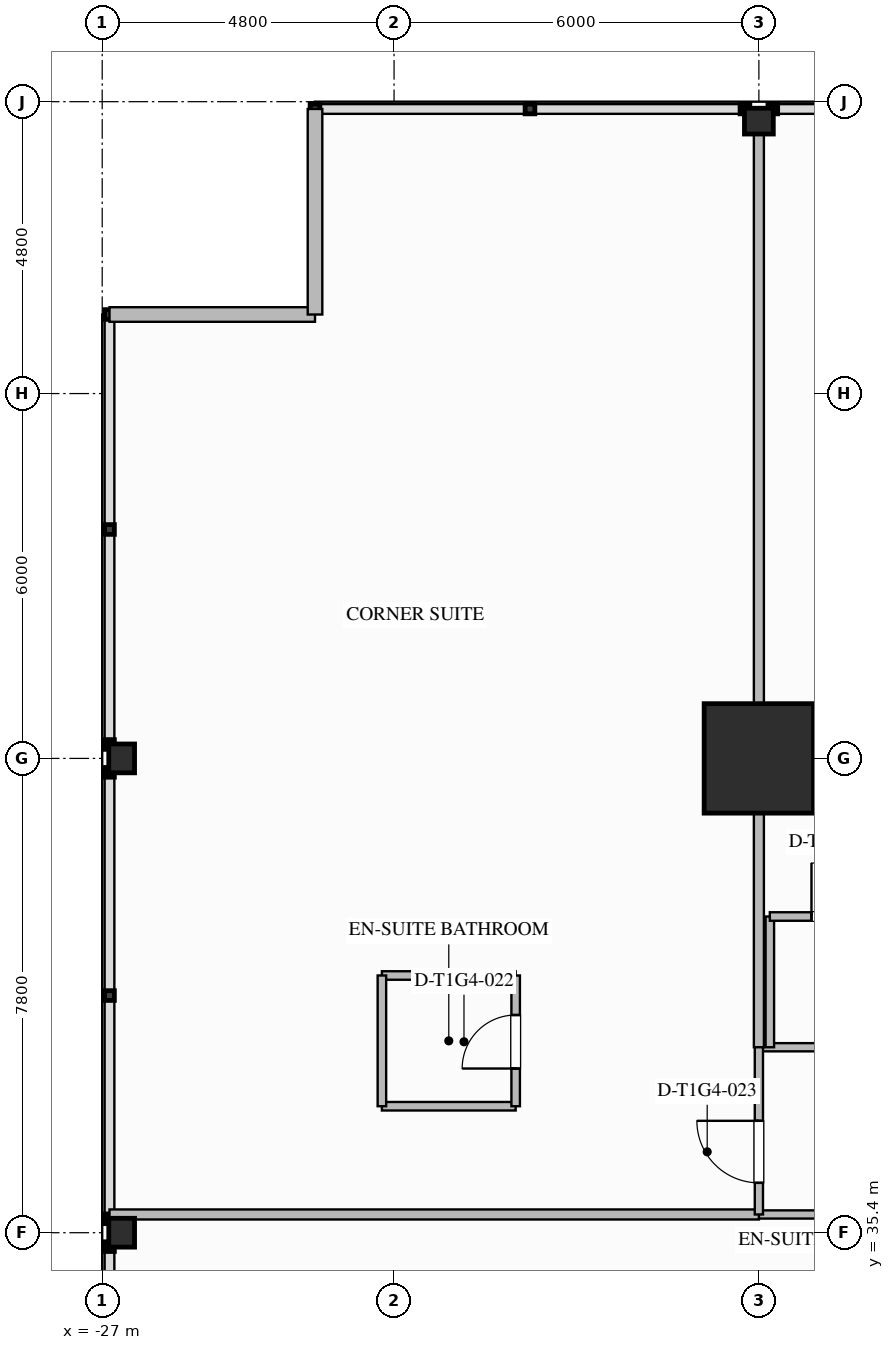
"""IFC4 building model, lengths in metres.
Left out: names, types, materials, properties, quantities, classifications, styles, units other than length and angle.
Written with IfcOpenShell. Run it as: python <this file> out.ifc"""

import sys

from ifc_helpers import new_model, si_unit, direction, frame, frame_2d, origin, origin_2d, place, context, subcontext, project, spatial, rectangle, i_section, extrude, element, fill, save


model = new_model("IFC4")
c1 = context("Model", 3, precision=1e-05, world=origin(), true_north=direction((0.0, 1.0)))
c2 = subcontext(c1, "Body", "Model", "MODEL_VIEW")
j1 = project(units=[si_unit("LENGTHUNIT", "METRE"), si_unit("PLANEANGLEUNIT", "RADIAN")], contexts=[c1])
p1 = place(None, origin())
s1 = spatial("IfcSite", under=j1, at=p1, CompositionType="ELEMENT")
p2 = place(p1, origin())
s2 = spatial("IfcBuilding", under=s1, at=p2, CompositionType="ELEMENT")
p3 = place(p2, frame((0.0, 0.0, 64.7)))
s3 = spatial("IfcBuildingStorey", under=s2, at=p3, CompositionType="ELEMENT", Elevation=64.7)
p4 = place(p3, frame((-16.2, 43.2, 0.0), z_axis=(0.0, 0.0, 1.0), x_axis=(1.0, 0.0, 0.0)))
e1 = element("IfcColumn", 1, at=p4, inside=s3, PredefinedType="COLUMN", context=c2, shape_type="SweptSolid", body=[
    extrude(rectangle(XDim=1.8, YDim=1.8, at=origin_2d()), origin(), (0.0, 0.0, 1.0), 3.5),
])
for number, where, z_axis, x_axis in (
    (2, (-26.68, 35.4, 0.0), (0.0, 0.0, 1.0), (1.0, 0.0, 0.0)),
    (3, (-26.68, 43.2, 0.0), (0.0, 0.0, 1.0), (1.0, 0.0, 0.0)),
    (4, (-16.2, 53.68, 0.0), (0.0, 0.0, 1.0), (0.0, 1.0, 0.0)),
):
    element("IfcColumn", number, at=place(p3, frame(where, z_axis=z_axis, x_axis=x_axis)), inside=s3, PredefinedType="COLUMN", context=c2, shape_type="SweptSolid", body=[
        extrude(i_section(OverallWidth=0.424, OverallDepth=0.474, WebThickness=0.048, FlangeThickness=0.077, FilletRadius=0.03, at=origin_2d()), origin(), (0.0, 0.0, 1.0), 3.497),
    ])
for number, where, z_axis, x_axis in (
    (5, (-26.88, 50.5, 0.0), (0.0, 0.0, 1.0), (1.0, 0.0, 0.0)),
    (6, (-23.5, 50.5, 0.0), (0.0, 0.0, 1.0), (0.0, 1.0, 0.0)),
):
    element("IfcWall", number, at=place(p3, frame(where, z_axis=z_axis, x_axis=x_axis)), inside=s3, PredefinedType="STANDARD", context=c2, shape_type="SweptSolid", body=[
        extrude(rectangle(XDim=3.38, YDim=0.24, at=frame_2d((1.69, 0.0))), origin(), (0.0, 0.0, 1.0), 3.24),
    ])
p5 = place(p3, frame((-16.2, 38.45, 0.0), z_axis=(0.0, 0.0, 1.0), x_axis=(1.0, 0.0, 0.0)))
e7 = element("IfcWall", 7, at=p5, inside=s3, PredefinedType="PARTITIONING", context=c2, shape_type="SweptSolid", body=[
    extrude(rectangle(XDim=32.4, YDim=0.135, at=frame_2d((16.2, 0.0))), origin(), (0.0, 0.0, 1.0), 3.24),
])
p6 = place(p5, frame((3.285, 0.0, 0.0)))
e8 = element("IfcOpeningElement", 8, at=p6, cuts=e7, PredefinedType="OPENING", context=c2, shape_type="SweptSolid", body=[
    extrude(rectangle(XDim=1.26, YDim=2.2, at=frame_2d((0.63, 1.1))), frame((0.0, 0.077, 0.0), z_axis=(0.0, -1.0, 0.0), x_axis=(1.0, 0.0, 0.0)), (0.0, 0.0, 1.0), 0.155),
])
p7 = place(p5, frame((8.59, 0.0, 0.0)))
e9 = element("IfcOpeningElement", 9, at=p7, cuts=e7, PredefinedType="OPENING", context=c2, shape_type="SweptSolid", body=[
    extrude(rectangle(XDim=0.96, YDim=2.15, at=frame_2d((0.48, 1.075))), frame((0.0, 0.077, 0.0), z_axis=(0.0, -1.0, 0.0), x_axis=(1.0, 0.0, 0.0)), (0.0, 0.0, 1.0), 0.155),
])
p8 = place(p5, frame((13.84, 0.0, 0.0)))
e10 = element("IfcOpeningElement", 10, at=p8, cuts=e7, PredefinedType="OPENING", context=c2, shape_type="SweptSolid", body=[
    extrude(rectangle(XDim=1.26, YDim=2.2, at=frame_2d((0.63, 1.1))), frame((0.0, 0.077, 0.0), z_axis=(0.0, -1.0, 0.0), x_axis=(1.0, 0.0, 0.0)), (0.0, 0.0, 1.0), 0.155),
])
p9 = place(p5, frame((18.635, 0.0, 0.0)))
e11 = element("IfcOpeningElement", 11, at=p9, cuts=e7, PredefinedType="OPENING", context=c2, shape_type="SweptSolid", body=[
    extrude(rectangle(XDim=1.02, YDim=2.15, at=frame_2d((0.51, 1.075))), frame((0.0, 0.077, 0.0), z_axis=(0.0, -1.0, 0.0), x_axis=(1.0, 0.0, 0.0)), (0.0, 0.0, 1.0), 0.155),
])
p10 = place(p5, frame((25.281, 0.0, 0.0)))
e12 = element("IfcOpeningElement", 12, at=p10, cuts=e7, PredefinedType="OPENING", context=c2, shape_type="SweptSolid", body=[
    extrude(rectangle(XDim=0.96, YDim=2.15, at=frame_2d((0.48, 1.075))), frame((0.0, 0.077, 0.0), z_axis=(0.0, -1.0, 0.0), x_axis=(1.0, 0.0, 0.0)), (0.0, 0.0, 1.0), 0.155),
])
p11 = place(p5, frame((30.285, 0.0, 0.0)))
e13 = element("IfcOpeningElement", 13, at=p11, cuts=e7, PredefinedType="OPENING", context=c2, shape_type="SweptSolid", body=[
    extrude(rectangle(XDim=1.26, YDim=2.2, at=frame_2d((0.63, 1.1))), frame((0.0, 0.077, 0.0), z_axis=(0.0, -1.0, 0.0), x_axis=(1.0, 0.0, 0.0)), (0.0, 0.0, 1.0), 0.155),
])
p12 = place(p3, frame((-16.2, 35.7, 0.0), z_axis=(0.0, 0.0, 1.0), x_axis=(1.0, 0.0, 0.0)))
e14 = element("IfcWall", 14, at=p12, inside=s3, PredefinedType="PARTITIONING", context=c2, shape_type="SweptSolid", body=[
    extrude(rectangle(XDim=5.4, YDim=0.135, at=frame_2d((2.7, 0.0))), origin(), (0.0, 0.0, 1.0), 3.24),
])
p13 = place(p3, frame((-16.2, 38.45, 0.0), z_axis=(0.0, 0.0, 1.0), x_axis=(0.0, 1.0, 0.0)))
e15 = element("IfcWall", 15, at=p13, inside=s3, PredefinedType="PARTITIONING", context=c2, shape_type="SweptSolid", body=[
    extrude(rectangle(XDim=15.43, YDim=0.165, at=frame_2d((7.715, 0.0))), origin(), (0.0, 0.0, 1.0), 2.452),
])
p14 = place(p3, frame((-26.88, 35.7, 0.0), z_axis=(0.0, 0.0, 1.0), x_axis=(1.0, 0.0, 0.0)))
e16 = element("IfcWall", 16, at=p14, inside=s3, PredefinedType="PARTITIONING", context=c2, shape_type="SweptSolid", body=[
    extrude(rectangle(XDim=10.68, YDim=0.165, at=frame_2d((5.34, 0.0))), origin(), (0.0, 0.0, 1.0), 2.452),
])
p15 = place(p3, frame((-16.2, 35.7, 0.0), z_axis=(0.0, 0.0, 1.0), x_axis=(0.0, 1.0, 0.0)))
e17 = element("IfcWall", 17, at=p15, inside=s3, PredefinedType="PARTITIONING", context=c2, shape_type="SweptSolid", body=[
    extrude(rectangle(XDim=2.75, YDim=0.135, at=frame_2d((1.375, 0.0))), origin(), (0.0, 0.0, 1.0), 2.452),
])
p16 = place(p15, frame((0.52, 0.0, 0.0)))
e18 = element("IfcOpeningElement", 18, at=p16, cuts=e17, PredefinedType="OPENING", context=c2, shape_type="SweptSolid", body=[
    extrude(rectangle(XDim=1.02, YDim=2.15, at=frame_2d((0.51, 1.075))), frame((0.0, 0.077, 0.0), z_axis=(0.0, -1.0, 0.0), x_axis=(1.0, 0.0, 0.0)), (0.0, 0.0, 1.0), 0.155),
])
for number, where, z_axis, x_axis in (
    (19, (-22.4, 37.48, 0.0), (0.0, 0.0, 1.0), (1.0, 0.0, 0.0)),
    (20, (-22.4, 39.63, 0.0), (0.0, 0.0, 1.0), (1.0, 0.0, 0.0)),
):
    element("IfcWall", number, at=place(p3, frame(where, z_axis=z_axis, x_axis=x_axis)), inside=s3, PredefinedType="PLUMBINGWALL", context=c2, shape_type="SweptSolid", body=[
        extrude(rectangle(XDim=2.2, YDim=0.14, at=frame_2d((1.1, 0.0))), origin(), (0.0, 0.0, 1.0), 3.24),
    ])
p17 = place(p3, frame((-22.4, 37.48, 0.0), z_axis=(0.0, 0.0, 1.0), x_axis=(0.0, 1.0, 0.0)))
e21 = element("IfcWall", 21, at=p17, inside=s3, PredefinedType="PLUMBINGWALL", context=c2, shape_type="SweptSolid", body=[
    extrude(rectangle(XDim=2.15, YDim=0.14, at=frame_2d((1.075, 0.0))), origin(), (0.0, 0.0, 1.0), 3.24),
])
p18 = place(p3, frame((-20.2, 37.48, 0.0), z_axis=(0.0, 0.0, 1.0), x_axis=(0.0, 1.0, 0.0)))
e22 = element("IfcWall", 22, at=p18, inside=s3, PredefinedType="PLUMBINGWALL", context=c2, shape_type="SweptSolid", body=[
    extrude(rectangle(XDim=2.15, YDim=0.14, at=frame_2d((1.075, 0.0))), origin(), (0.0, 0.0, 1.0), 3.24),
])
p19 = place(p18, frame((0.62, 0.0, 0.0)))
e23 = element("IfcOpeningElement", 23, at=p19, cuts=e22, PredefinedType="OPENING", context=c2, shape_type="SweptSolid", body=[
    extrude(rectangle(XDim=0.88, YDim=2.1, at=frame_2d((0.44, 1.05))), frame((0.0, 0.08, 0.0), z_axis=(0.0, -1.0, 0.0), x_axis=(1.0, 0.0, 0.0)), (0.0, 0.0, 1.0), 0.16),
])
p20 = place(p3, frame((-16.02, 38.45, 0.0), z_axis=(0.0, 0.0, 1.0), x_axis=(0.0, 1.0, 0.0)))
e24 = element("IfcWall", 24, at=p20, inside=s3, PredefinedType="PLUMBINGWALL", context=c2, shape_type="SweptSolid", body=[
    extrude(rectangle(XDim=2.15, YDim=0.14, at=frame_2d((1.075, 0.0))), origin(), (0.0, 0.0, 1.0), 2.452),
])
p21 = place(p3, frame((-16.02, 40.6, 0.0), z_axis=(0.0, 0.0, 1.0), x_axis=(1.0, 0.0, 0.0)))
e25 = element("IfcWall", 25, at=p21, inside=s3, PredefinedType="PLUMBINGWALL", context=c2, shape_type="SweptSolid", body=[
    extrude(rectangle(XDim=2.25, YDim=0.14, at=frame_2d((1.125, 0.0))), origin(), (0.0, 0.0, 1.0), 3.24),
])
p22 = place(p21, frame((0.685, 0.0, 0.0)))
e26 = element("IfcOpeningElement", 26, at=p22, cuts=e25, PredefinedType="OPENING", context=c2, shape_type="SweptSolid", body=[
    extrude(rectangle(XDim=0.88, YDim=2.1, at=frame_2d((0.44, 1.05))), frame((0.0, 0.08, 0.0), z_axis=(0.0, -1.0, 0.0), x_axis=(1.0, 0.0, 0.0)), (0.0, 0.0, 1.0), 0.16),
])
p23 = place(p19, origin())
e27 = element("IfcDoor", 27, at=p23, inside=s3, OperationType="SINGLE_SWING_LEFT", PredefinedType="DOOR", context=c2, shape_type="SweptSolid", body=[
    extrude(rectangle(XDim=0.88, YDim=2.1, at=frame_2d((0.44, 1.05))), frame((0.0, 0.025, 0.0), z_axis=(0.0, -1.0, 0.0), x_axis=(1.0, 0.0, 0.0)), (0.0, 0.0, 1.0), 0.05),
])
fill(e23, e27)
p24 = place(p16, origin())
e28 = element("IfcDoor", 28, at=p24, inside=s3, OperationType="SINGLE_SWING_RIGHT", PredefinedType="DOOR", context=c2, shape_type="SweptSolid", body=[
    extrude(rectangle(XDim=1.02, YDim=2.15, at=frame_2d((0.51, 1.075))), frame((0.0, 0.025, 0.0), z_axis=(0.0, -1.0, 0.0), x_axis=(1.0, 0.0, 0.0)), (0.0, 0.0, 1.0), 0.05),
])
fill(e18, e28)
p25 = place(p22, origin())
e29 = element("IfcDoor", 29, at=p25, inside=s3, OperationType="SINGLE_SWING_LEFT", PredefinedType="DOOR", context=c2, shape_type="SweptSolid", body=[
    extrude(rectangle(XDim=0.88, YDim=2.1, at=frame_2d((0.44, 1.05))), frame((0.0, 0.025, 0.0), z_axis=(0.0, -1.0, 0.0), x_axis=(1.0, 0.0, 0.0)), (0.0, 0.0, 1.0), 0.05),
])
fill(e26, e29)
save(model, sys.argv[1])
